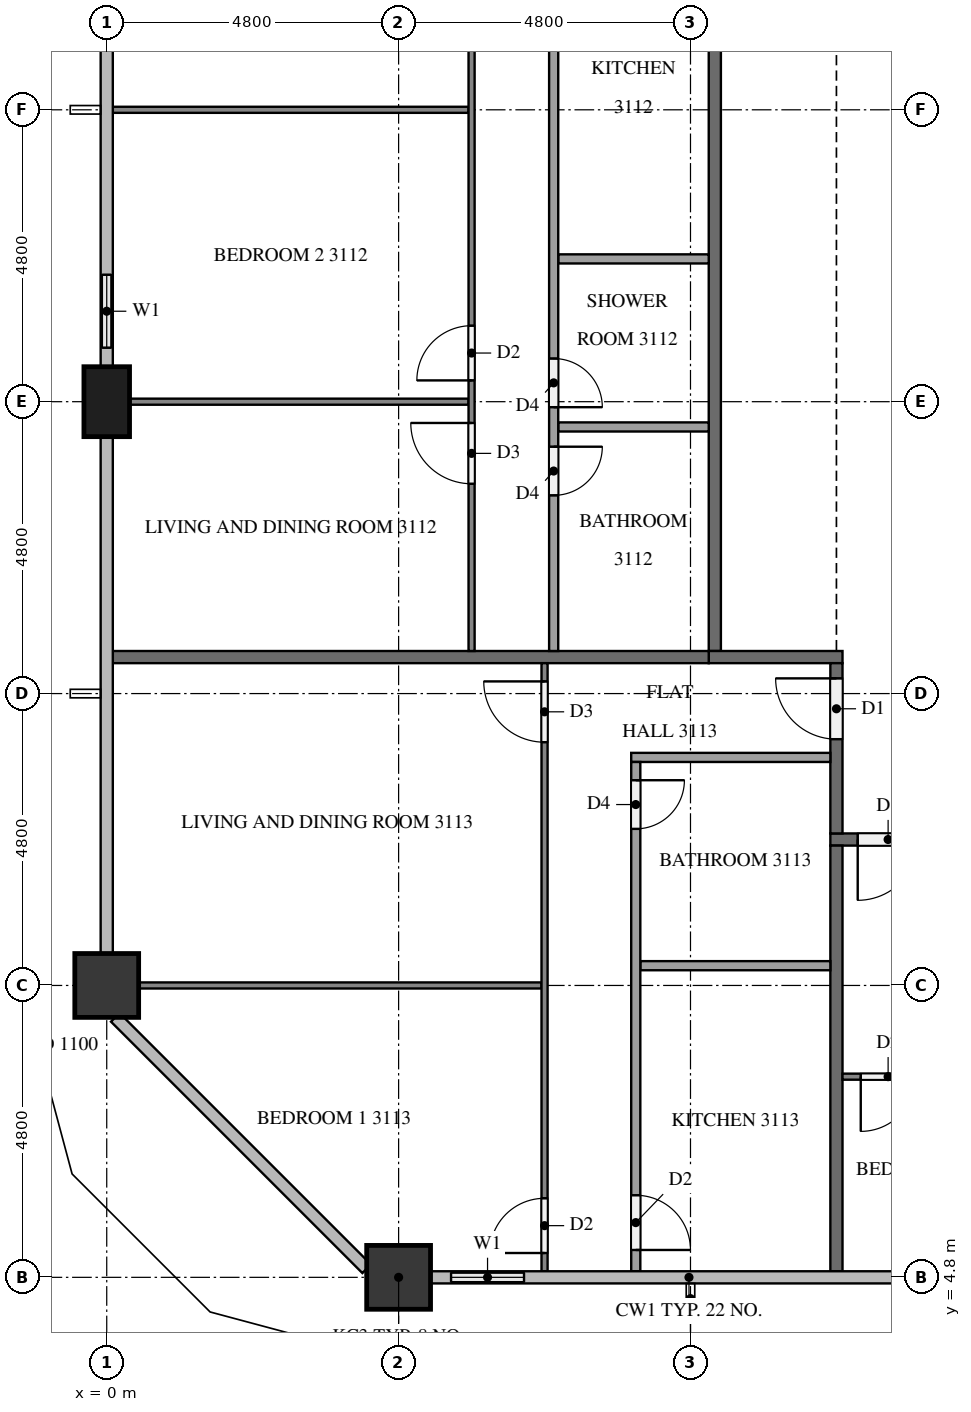
"""IFC4 building model, lengths in metres.
Left out: names, types, materials, properties, quantities, classifications, styles, units other than length and angle.
Written with IfcOpenShell. Run it as: python <this file> out.ifc"""

import sys

from ifc_helpers import new_model, si_unit, direction, frame, frame_2d, origin, origin_2d, place, context, subcontext, project, spatial, rectangle, extrude, element, fill, save


model = new_model("IFC4")
c1 = context("Model", 3, precision=1e-05, world=origin(), true_north=direction((0.0, 1.0)))
c2 = subcontext(c1, "Body", "Model", "MODEL_VIEW")
j1 = project(units=[si_unit("LENGTHUNIT", "METRE"), si_unit("PLANEANGLEUNIT", "RADIAN")], contexts=[c1])
p1 = place(None, origin())
s1 = spatial("IfcSite", under=j1, at=p1, CompositionType="ELEMENT")
p2 = place(p1, origin())
s2 = spatial("IfcBuilding", under=s1, at=p2, CompositionType="ELEMENT")
p3 = place(p2, frame((0.0, 0.0, 122.6)))
s3 = spatial("IfcBuildingStorey", under=s2, at=p3, CompositionType="ELEMENT", Elevation=122.6)
p4 = place(p3, frame((4.8, 4.8, 0.0), z_axis=(0.0, 0.0, 1.0), x_axis=(1.0, 0.0, 0.0)))
e1 = element("IfcColumn", 1, at=p4, inside=s3, PredefinedType="COLUMN", context=c2, shape_type="SweptSolid", body=[
    extrude(rectangle(XDim=1.05, YDim=1.05, at=origin_2d()), origin(), (0.0, 0.0, 1.0), 3.2),
])
p5 = place(p3, frame((0.0, 19.2, 0.0), z_axis=(0.0, 0.0, 1.0), x_axis=(0.0, 1.0, 0.0)))
e2 = element("IfcColumn", 2, at=p5, inside=s3, PredefinedType="COLUMN", context=c2, shape_type="SweptSolid", body=[
    extrude(rectangle(XDim=1.15, YDim=0.75, at=origin_2d()), origin(), (0.0, 0.0, 1.0), 3.2),
])
p6 = place(p3, frame((0.0, 9.6, 0.0), z_axis=(0.0, 0.0, 1.0), x_axis=(1.0, 0.0, 0.0)))
e3 = element("IfcColumn", 3, at=p6, inside=s3, PredefinedType="COLUMN", context=c2, shape_type="SweptSolid", body=[
    extrude(rectangle(XDim=1.05, YDim=1.05, at=origin_2d()), origin(), (0.0, 0.0, 1.0), 3.2),
])
p7 = place(p3, frame((5.325, 4.8, 0.0), z_axis=(0.0, 0.0, 1.0), x_axis=(1.0, 0.0, 0.0)))
e4 = element("IfcWall", 4, at=p7, inside=s3, PredefinedType="SOLIDWALL", context=c2, shape_type="SweptSolid", body=[
    extrude(rectangle(XDim=1.875, YDim=0.15, at=frame_2d((0.938, 0.0))), origin(), (0.0, 0.0, 1.0), 3.2),
])
p8 = place(p7, frame((0.337, 0.0, 0.9)))
e5 = element("IfcOpeningElement", 5, at=p8, cuts=e4, PredefinedType="OPENING", context=c2, shape_type="SweptSolid", body=[
    extrude(rectangle(XDim=1.2, YDim=1.4, at=frame_2d((0.6, 0.7))), frame((0.0, 0.085, 0.0), z_axis=(0.0, -1.0, 0.0), x_axis=(1.0, 0.0, 0.0)), (0.0, 0.0, 1.0), 0.17),
])
p9 = place(p3, frame((0.0, 21.6, 0.0), z_axis=(0.0, 0.0, 1.0), x_axis=(0.0, -1.0, 0.0)))
e6 = element("IfcWall", 6, at=p9, inside=s3, PredefinedType="SOLIDWALL", context=c2, shape_type="SweptSolid", body=[
    extrude(rectangle(XDim=1.825, YDim=0.15, at=frame_2d((0.913, 0.0))), origin(), (0.0, 0.0, 1.0), 3.2),
])
p10 = place(p9, frame((0.312, 0.0, 0.9)))
e7 = element("IfcOpeningElement", 7, at=p10, cuts=e6, PredefinedType="OPENING", context=c2, shape_type="SweptSolid", body=[
    extrude(rectangle(XDim=1.2, YDim=1.4, at=frame_2d((0.6, 0.7))), frame((0.0, 0.085, 0.0), z_axis=(0.0, -1.0, 0.0), x_axis=(1.0, 0.0, 0.0)), (0.0, 0.0, 1.0), 0.17),
])
p11 = place(p3, frame((50.5, 12.0, 0.0), z_axis=(0.0, 0.0, 1.0), x_axis=(-1.0, 0.0, 0.0)))
e8 = element("IfcWall", 8, at=p11, inside=s3, PredefinedType="PARTITIONING", context=c2, shape_type="SweptSolid", body=[
    extrude(rectangle(XDim=38.6, YDim=0.2, at=frame_2d((19.3, 0.0))), origin(), (0.0, 0.0, 1.0), 3.2),
])
p12 = place(p11, frame((37.15, 0.0, 0.0)))
e9 = element("IfcOpeningElement", 9, at=p12, cuts=e8, PredefinedType="OPENING", context=c2, shape_type="SweptSolid", body=[
    extrude(rectangle(XDim=1.0, YDim=2.1, at=frame_2d((0.5, 1.05))), frame((0.0, 0.11, 0.0), z_axis=(0.0, -1.0, 0.0), x_axis=(1.0, 0.0, 0.0)), (0.0, 0.0, 1.0), 0.22),
])
p13 = place(p11, frame((7.65, 0.0, 0.0)))
e10 = element("IfcOpeningElement", 10, at=p13, cuts=e8, PredefinedType="OPENING", context=c2, shape_type="SweptSolid", body=[
    extrude(rectangle(XDim=1.0, YDim=2.1, at=frame_2d((0.5, 1.05))), frame((0.0, 0.11, 0.0), z_axis=(0.0, -1.0, 0.0), x_axis=(1.0, 0.0, 0.0)), (0.0, 0.0, 1.0), 0.22),
])
p14 = place(p11, frame((5.95, 0.0, 0.0)))
e11 = element("IfcOpeningElement", 11, at=p14, cuts=e8, PredefinedType="OPENING", context=c2, shape_type="SweptSolid", body=[
    extrude(rectangle(XDim=1.0, YDim=2.1, at=frame_2d((0.5, 1.05))), frame((0.0, 0.11, 0.0), z_axis=(0.0, -1.0, 0.0), x_axis=(1.0, 0.0, 0.0)), (0.0, 0.0, 1.0), 0.22),
])
p15 = place(p3, frame((10.0, 15.1, 0.0), z_axis=(0.0, 0.0, 1.0), x_axis=(0.0, 1.0, 0.0)))
e12 = element("IfcWall", 12, at=p15, inside=s3, PredefinedType="PARTITIONING", context=c2, shape_type="SweptSolid", body=[
    extrude(rectangle(XDim=22.6, YDim=0.2, at=frame_2d((11.3, 0.0))), origin(), (0.0, 0.0, 1.0), 3.2),
])
p16 = place(p15, frame((21.35, 0.0, 0.0)))
e13 = element("IfcOpeningElement", 13, at=p16, cuts=e12, PredefinedType="OPENING", context=c2, shape_type="SweptSolid", body=[
    extrude(rectangle(XDim=1.0, YDim=2.1, at=frame_2d((0.5, 1.05))), frame((0.0, 0.11, 0.0), z_axis=(0.0, -1.0, 0.0), x_axis=(1.0, 0.0, 0.0)), (0.0, 0.0, 1.0), 0.22),
])
p17 = place(p15, frame((12.35, 0.0, 0.0)))
e14 = element("IfcOpeningElement", 14, at=p17, cuts=e12, PredefinedType="OPENING", context=c2, shape_type="SweptSolid", body=[
    extrude(rectangle(XDim=1.0, YDim=2.1, at=frame_2d((0.5, 1.05))), frame((0.0, 0.11, 0.0), z_axis=(0.0, -1.0, 0.0), x_axis=(1.0, 0.0, 0.0)), (0.0, 0.0, 1.0), 0.22),
])
p18 = place(p3, frame((9.9, 15.0, 0.0), z_axis=(0.0, 0.0, 1.0), x_axis=(1.0, 0.0, 0.0)))
e15 = element("IfcWall", 15, at=p18, inside=s3, PredefinedType="PARTITIONING", context=c2, shape_type="SweptSolid", body=[
    extrude(rectangle(XDim=2.2, YDim=0.2, at=frame_2d((1.1, 0.0))), origin(), (0.0, 0.0, 1.0), 3.2),
])
p19 = place(p3, frame((12.0, 12.1, 0.0), z_axis=(0.0, 0.0, 1.0), x_axis=(0.0, 1.0, 0.0)))
e16 = element("IfcWall", 16, at=p19, inside=s3, PredefinedType="PARTITIONING", context=c2, shape_type="SweptSolid", body=[
    extrude(rectangle(XDim=2.8, YDim=0.2, at=frame_2d((1.4, 0.0))), origin(), (0.0, 0.0, 1.0), 3.2),
])
p20 = place(p19, frame((1.55, 0.0, 0.0)))
e17 = element("IfcOpeningElement", 17, at=p20, cuts=e16, PredefinedType="OPENING", context=c2, shape_type="SweptSolid", body=[
    extrude(rectangle(XDim=1.0, YDim=2.1, at=frame_2d((0.5, 1.05))), frame((0.0, 0.11, 0.0), z_axis=(0.0, -1.0, 0.0), x_axis=(1.0, 0.0, 0.0)), (0.0, 0.0, 1.0), 0.22),
])
p21 = place(p3, frame((12.0, 4.9, 0.0), z_axis=(0.0, 0.0, 1.0), x_axis=(0.0, 1.0, 0.0)))
e18 = element("IfcWall", 18, at=p21, inside=s3, PredefinedType="PARTITIONING", context=c2, shape_type="SweptSolid", body=[
    extrude(rectangle(XDim=7.0, YDim=0.2, at=frame_2d((3.5, 0.0))), origin(), (0.0, 0.0, 1.0), 3.2),
])
p22 = place(p3, frame((0.1, 15.0, 0.0), z_axis=(0.0, 0.0, 1.0), x_axis=(1.0, 0.0, 0.0)))
e19 = element("IfcWall", 19, at=p22, inside=s3, PredefinedType="PARTITIONING", context=c2, shape_type="SweptSolid", body=[
    extrude(rectangle(XDim=9.8, YDim=0.2, at=frame_2d((4.9, 0.0))), origin(), (0.0, 0.0, 1.0), 3.2),
])
p23 = place(p3, frame((26.3, 8.1, 0.0), z_axis=(0.0, 0.0, 1.0), x_axis=(-1.0, 0.0, 0.0)))
e20 = element("IfcWall", 20, at=p23, inside=s3, PredefinedType="PARTITIONING", context=c2, shape_type="SweptSolid", body=[
    extrude(rectangle(XDim=14.2, YDim=0.1, at=frame_2d((7.1, 0.0))), origin(), (0.0, 0.0, 1.0), 3.2),
])
p24 = place(p23, frame((13.0, 0.0, 0.0)))
e21 = element("IfcOpeningElement", 21, at=p24, cuts=e20, PredefinedType="OPENING", context=c2, shape_type="SweptSolid", body=[
    extrude(rectangle(XDim=0.9, YDim=2.1, at=frame_2d((0.45, 1.05))), frame((0.0, 0.06, 0.0), z_axis=(0.0, -1.0, 0.0), x_axis=(1.0, 0.0, 0.0)), (0.0, 0.0, 1.0), 0.12),
])
p25 = place(p23, frame((5.05, 0.0, 0.0)))
e22 = element("IfcOpeningElement", 22, at=p25, cuts=e20, PredefinedType="OPENING", context=c2, shape_type="SweptSolid", body=[
    extrude(rectangle(XDim=0.9, YDim=2.1, at=frame_2d((0.45, 1.05))), frame((0.0, 0.06, 0.0), z_axis=(0.0, -1.0, 0.0), x_axis=(1.0, 0.0, 0.0)), (0.0, 0.0, 1.0), 0.12),
])
p26 = place(p23, frame((3.35, 0.0, 0.0)))
e23 = element("IfcOpeningElement", 23, at=p26, cuts=e20, PredefinedType="OPENING", context=c2, shape_type="SweptSolid", body=[
    extrude(rectangle(XDim=1.0, YDim=2.1, at=frame_2d((0.5, 1.05))), frame((0.0, 0.06, 0.0), z_axis=(0.0, -1.0, 0.0), x_axis=(1.0, 0.0, 0.0)), (0.0, 0.0, 1.0), 0.12),
])
p27 = place(p3, frame((5.95, 24.0, 0.0), z_axis=(0.0, 0.0, 1.0), x_axis=(-1.0, 0.0, 0.0)))
e24 = element("IfcWall", 24, at=p27, inside=s3, PredefinedType="PARTITIONING", context=c2, shape_type="SweptSolid", body=[
    extrude(rectangle(XDim=5.85, YDim=0.1, at=frame_2d((2.925, 0.0))), origin(), (0.0, 0.0, 1.0), 3.2),
])
p28 = place(p3, frame((5.95, 19.2, 0.0), z_axis=(0.0, 0.0, 1.0), x_axis=(-1.0, 0.0, 0.0)))
e25 = element("IfcWall", 25, at=p28, inside=s3, PredefinedType="PARTITIONING", context=c2, shape_type="SweptSolid", body=[
    extrude(rectangle(XDim=5.575, YDim=0.1, at=frame_2d((2.788, 0.0))), origin(), (0.0, 0.0, 1.0), 3.2),
])
p29 = place(p3, frame((6.0, 15.1, 0.0), z_axis=(0.0, 0.0, 1.0), x_axis=(0.0, 1.0, 0.0)))
e26 = element("IfcWall", 26, at=p29, inside=s3, PredefinedType="PARTITIONING", context=c2, shape_type="SweptSolid", body=[
    extrude(rectangle(XDim=13.6, YDim=0.1, at=frame_2d((6.8, 0.0))), origin(), (0.0, 0.0, 1.0), 3.2),
])
p30 = place(p29, frame((12.4, 0.0, 0.0)))
e27 = element("IfcOpeningElement", 27, at=p30, cuts=e26, PredefinedType="OPENING", context=c2, shape_type="SweptSolid", body=[
    extrude(rectangle(XDim=0.9, YDim=2.1, at=frame_2d((0.45, 1.05))), frame((0.0, 0.06, 0.0), z_axis=(0.0, -1.0, 0.0), x_axis=(1.0, 0.0, 0.0)), (0.0, 0.0, 1.0), 0.12),
])
p31 = place(p29, frame((4.45, 0.0, 0.0)))
e28 = element("IfcOpeningElement", 28, at=p31, cuts=e26, PredefinedType="OPENING", context=c2, shape_type="SweptSolid", body=[
    extrude(rectangle(XDim=0.9, YDim=2.1, at=frame_2d((0.45, 1.05))), frame((0.0, 0.06, 0.0), z_axis=(0.0, -1.0, 0.0), x_axis=(1.0, 0.0, 0.0)), (0.0, 0.0, 1.0), 0.12),
])
p32 = place(p29, frame((2.75, 0.0, 0.0)))
e29 = element("IfcOpeningElement", 29, at=p32, cuts=e26, PredefinedType="OPENING", context=c2, shape_type="SweptSolid", body=[
    extrude(rectangle(XDim=1.0, YDim=2.1, at=frame_2d((0.5, 1.05))), frame((0.0, 0.06, 0.0), z_axis=(0.0, -1.0, 0.0), x_axis=(1.0, 0.0, 0.0)), (0.0, 0.0, 1.0), 0.12),
])
for number, where, z_axis, x_axis in (
    (30, (9.9, 21.548, 0.0), (0.0, 0.0, 1.0), (-1.0, 0.0, 0.0)),
    (31, (9.9, 18.785, 0.0), (0.0, 0.0, 1.0), (-1.0, 0.0, 0.0)),
):
    element("IfcWall", number, at=place(p3, frame(where, z_axis=z_axis, x_axis=x_axis)), inside=s3, PredefinedType="PARTITIONING", context=c2, shape_type="SweptSolid", body=[
        extrude(rectangle(XDim=2.475, YDim=0.15, at=frame_2d((1.237, 0.0))), origin(), (0.0, 0.0, 1.0), 3.2),
    ])
p33 = place(p3, frame((7.35, 27.075, 0.0), z_axis=(0.0, 0.0, 1.0), x_axis=(0.0, -1.0, 0.0)))
e32 = element("IfcWall", 32, at=p33, inside=s3, PredefinedType="PARTITIONING", context=c2, shape_type="SweptSolid", body=[
    extrude(rectangle(XDim=11.975, YDim=0.15, at=frame_2d((5.987, 0.0))), origin(), (0.0, 0.0, 1.0), 3.2),
])
p34 = place(p33, frame((0.3, 0.0, 0.0)))
e33 = element("IfcOpeningElement", 33, at=p34, cuts=e32, PredefinedType="OPENING", context=c2, shape_type="SweptSolid", body=[
    extrude(rectangle(XDim=0.9, YDim=2.1, at=frame_2d((0.45, 1.05))), frame((0.0, 0.085, 0.0), z_axis=(0.0, -1.0, 0.0), x_axis=(1.0, 0.0, 0.0)), (0.0, 0.0, 1.0), 0.17),
])
p35 = place(p33, frame((7.165, 0.0, 0.0)))
e34 = element("IfcOpeningElement", 34, at=p35, cuts=e32, PredefinedType="OPENING", context=c2, shape_type="SweptSolid", body=[
    extrude(rectangle(XDim=0.8, YDim=2.1, at=frame_2d((0.4, 1.05))), frame((0.0, 0.085, 0.0), z_axis=(0.0, -1.0, 0.0), x_axis=(1.0, 0.0, 0.0)), (0.0, 0.0, 1.0), 0.17),
])
p36 = place(p33, frame((8.615, 0.0, 0.0)))
e35 = element("IfcOpeningElement", 35, at=p36, cuts=e32, PredefinedType="OPENING", context=c2, shape_type="SweptSolid", body=[
    extrude(rectangle(XDim=0.8, YDim=2.1, at=frame_2d((0.4, 1.05))), frame((0.0, 0.085, 0.0), z_axis=(0.0, -1.0, 0.0), x_axis=(1.0, 0.0, 0.0)), (0.0, 0.0, 1.0), 0.17),
])
p37 = place(p3, frame((7.15, 9.6, 0.0), z_axis=(0.0, 0.0, 1.0), x_axis=(-1.0, 0.0, 0.0)))
e36 = element("IfcWall", 36, at=p37, inside=s3, PredefinedType="PARTITIONING", context=c2, shape_type="SweptSolid", body=[
    extrude(rectangle(XDim=6.625, YDim=0.1, at=frame_2d((3.312, 0.0))), origin(), (0.0, 0.0, 1.0), 3.2),
])
p38 = place(p3, frame((7.2, 4.9, 0.0), z_axis=(0.0, 0.0, 1.0), x_axis=(0.0, 1.0, 0.0)))
e37 = element("IfcWall", 37, at=p38, inside=s3, PredefinedType="PARTITIONING", context=c2, shape_type="SweptSolid", body=[
    extrude(rectangle(XDim=10.0, YDim=0.1, at=frame_2d((5.0, 0.0))), origin(), (0.0, 0.0, 1.0), 3.2),
])
p39 = place(p38, frame((8.7, 0.0, 0.0)))
e38 = element("IfcOpeningElement", 38, at=p39, cuts=e37, PredefinedType="OPENING", context=c2, shape_type="SweptSolid", body=[
    extrude(rectangle(XDim=1.0, YDim=2.1, at=frame_2d((0.5, 1.05))), frame((0.0, 0.06, 0.0), z_axis=(0.0, -1.0, 0.0), x_axis=(1.0, 0.0, 0.0)), (0.0, 0.0, 1.0), 0.12),
])
p40 = place(p38, frame((0.3, 0.0, 0.0)))
e39 = element("IfcOpeningElement", 39, at=p40, cuts=e37, PredefinedType="OPENING", context=c2, shape_type="SweptSolid", body=[
    extrude(rectangle(XDim=0.9, YDim=2.1, at=frame_2d((0.45, 1.05))), frame((0.0, 0.06, 0.0), z_axis=(0.0, -1.0, 0.0), x_axis=(1.0, 0.0, 0.0)), (0.0, 0.0, 1.0), 0.12),
])
p41 = place(p3, frame((11.9, 9.925, 0.0), z_axis=(0.0, 0.0, 1.0), x_axis=(-1.0, 0.0, 0.0)))
e40 = element("IfcWall", 40, at=p41, inside=s3, PredefinedType="PARTITIONING", context=c2, shape_type="SweptSolid", body=[
    extrude(rectangle(XDim=3.125, YDim=0.15, at=frame_2d((1.562, 0.0))), origin(), (0.0, 0.0, 1.0), 3.2),
])
p42 = place(p3, frame((11.9, 13.35, 0.0), z_axis=(0.0, 0.0, 1.0), x_axis=(-1.0, 0.0, 0.0)))
e41 = element("IfcWall", 41, at=p42, inside=s3, PredefinedType="PARTITIONING", context=c2, shape_type="SweptSolid", body=[
    extrude(rectangle(XDim=3.275, YDim=0.15, at=frame_2d((1.637, 0.0))), origin(), (0.0, 0.0, 1.0), 3.2),
])
p43 = place(p3, frame((8.7, 13.275, 0.0), z_axis=(0.0, 0.0, 1.0), x_axis=(0.0, -1.0, 0.0)))
e42 = element("IfcWall", 42, at=p43, inside=s3, PredefinedType="PARTITIONING", context=c2, shape_type="SweptSolid", body=[
    extrude(rectangle(XDim=8.375, YDim=0.15, at=frame_2d((4.188, 0.0))), origin(), (0.0, 0.0, 1.0), 3.2),
])
p44 = place(p43, frame((0.3, 0.0, 0.0)))
e43 = element("IfcOpeningElement", 43, at=p44, cuts=e42, PredefinedType="OPENING", context=c2, shape_type="SweptSolid", body=[
    extrude(rectangle(XDim=0.8, YDim=2.1, at=frame_2d((0.4, 1.05))), frame((0.0, 0.085, 0.0), z_axis=(0.0, -1.0, 0.0), x_axis=(1.0, 0.0, 0.0)), (0.0, 0.0, 1.0), 0.17),
])
p45 = place(p43, frame((7.125, 0.0, 0.0)))
e44 = element("IfcOpeningElement", 44, at=p45, cuts=e42, PredefinedType="OPENING", context=c2, shape_type="SweptSolid", body=[
    extrude(rectangle(XDim=0.9, YDim=2.1, at=frame_2d((0.45, 1.05))), frame((0.0, 0.085, 0.0), z_axis=(0.0, -1.0, 0.0), x_axis=(1.0, 0.0, 0.0)), (0.0, 0.0, 1.0), 0.17),
])
p46 = place(p8, origin())
e45 = element("IfcWindow", 45, at=p46, inside=s3, PartitioningType="SINGLE_PANEL", PredefinedType="WINDOW", context=c2, shape_type="SweptSolid", body=[
    extrude(rectangle(XDim=1.2, YDim=1.4, at=frame_2d((0.6, 0.7))), frame((0.0, 0.03, 0.0), z_axis=(0.0, -1.0, 0.0), x_axis=(1.0, 0.0, 0.0)), (0.0, 0.0, 1.0), 0.06),
])
fill(e5, e45)
p47 = place(p10, origin())
e46 = element("IfcWindow", 46, at=p47, inside=s3, PartitioningType="SINGLE_PANEL", PredefinedType="WINDOW", context=c2, shape_type="SweptSolid", body=[
    extrude(rectangle(XDim=1.2, YDim=1.4, at=frame_2d((0.6, 0.7))), frame((0.0, 0.03, 0.0), z_axis=(0.0, -1.0, 0.0), x_axis=(1.0, 0.0, 0.0)), (0.0, 0.0, 1.0), 0.06),
])
fill(e7, e46)
p48 = place(p12, origin())
e47 = element("IfcDoor", 47, at=p48, inside=s3, OperationType="SINGLE_SWING_RIGHT", PredefinedType="DOOR", context=c2, shape_type="SweptSolid", body=[
    extrude(rectangle(XDim=1.0, YDim=2.1, at=frame_2d((0.5, 1.05))), frame((0.0, 0.025, 0.0), z_axis=(0.0, -1.0, 0.0), x_axis=(1.0, 0.0, 0.0)), (0.0, 0.0, 1.0), 0.05),
])
fill(e9, e47)
p49 = place(p20, origin())
e48 = element("IfcDoor", 48, at=p49, inside=s3, OperationType="SINGLE_SWING_RIGHT", PredefinedType="DOOR", context=c2, shape_type="SweptSolid", body=[
    extrude(rectangle(XDim=1.0, YDim=2.1, at=frame_2d((0.5, 1.05))), frame((0.0, 0.025, 0.0), z_axis=(0.0, -1.0, 0.0), x_axis=(1.0, 0.0, 0.0)), (0.0, 0.0, 1.0), 0.05),
])
fill(e17, e48)
p50 = place(p24, origin())
e49 = element("IfcDoor", 49, at=p50, inside=s3, OperationType="SINGLE_SWING_RIGHT", PredefinedType="DOOR", context=c2, shape_type="SweptSolid", body=[
    extrude(rectangle(XDim=0.9, YDim=2.1, at=frame_2d((0.45, 1.05))), frame((0.0, 0.025, 0.0), z_axis=(0.0, -1.0, 0.0), x_axis=(1.0, 0.0, 0.0)), (0.0, 0.0, 1.0), 0.05),
])
fill(e21, e49)
p51 = place(p31, origin())
e50 = element("IfcDoor", 50, at=p51, inside=s3, OperationType="SINGLE_SWING_LEFT", PredefinedType="DOOR", context=c2, shape_type="SweptSolid", body=[
    extrude(rectangle(XDim=0.9, YDim=2.1, at=frame_2d((0.45, 1.05))), frame((0.0, 0.025, 0.0), z_axis=(0.0, -1.0, 0.0), x_axis=(1.0, 0.0, 0.0)), (0.0, 0.0, 1.0), 0.05),
])
fill(e28, e50)
p52 = place(p32, origin())
e51 = element("IfcDoor", 51, at=p52, inside=s3, OperationType="SINGLE_SWING_RIGHT", PredefinedType="DOOR", context=c2, shape_type="SweptSolid", body=[
    extrude(rectangle(XDim=1.0, YDim=2.1, at=frame_2d((0.5, 1.05))), frame((0.0, 0.025, 0.0), z_axis=(0.0, -1.0, 0.0), x_axis=(1.0, 0.0, 0.0)), (0.0, 0.0, 1.0), 0.05),
])
fill(e29, e51)
p53 = place(p35, origin())
e52 = element("IfcDoor", 52, at=p53, inside=s3, OperationType="SINGLE_SWING_RIGHT", PredefinedType="DOOR", context=c2, shape_type="SweptSolid", body=[
    extrude(rectangle(XDim=0.8, YDim=2.1, at=frame_2d((0.4, 1.05))), frame((0.0, 0.025, 0.0), z_axis=(0.0, -1.0, 0.0), x_axis=(1.0, 0.0, 0.0)), (0.0, 0.0, 1.0), 0.05),
])
fill(e34, e52)
p54 = place(p36, origin())
e53 = element("IfcDoor", 53, at=p54, inside=s3, OperationType="SINGLE_SWING_LEFT", PredefinedType="DOOR", context=c2, shape_type="SweptSolid", body=[
    extrude(rectangle(XDim=0.8, YDim=2.1, at=frame_2d((0.4, 1.05))), frame((0.0, 0.025, 0.0), z_axis=(0.0, -1.0, 0.0), x_axis=(1.0, 0.0, 0.0)), (0.0, 0.0, 1.0), 0.05),
])
fill(e35, e53)
p55 = place(p39, origin())
e54 = element("IfcDoor", 54, at=p55, inside=s3, OperationType="SINGLE_SWING_RIGHT", PredefinedType="DOOR", context=c2, shape_type="SweptSolid", body=[
    extrude(rectangle(XDim=1.0, YDim=2.1, at=frame_2d((0.5, 1.05))), frame((0.0, 0.025, 0.0), z_axis=(0.0, -1.0, 0.0), x_axis=(1.0, 0.0, 0.0)), (0.0, 0.0, 1.0), 0.05),
])
fill(e38, e54)
p56 = place(p40, origin())
e55 = element("IfcDoor", 55, at=p56, inside=s3, OperationType="SINGLE_SWING_LEFT", PredefinedType="DOOR", context=c2, shape_type="SweptSolid", body=[
    extrude(rectangle(XDim=0.9, YDim=2.1, at=frame_2d((0.45, 1.05))), frame((0.0, 0.025, 0.0), z_axis=(0.0, -1.0, 0.0), x_axis=(1.0, 0.0, 0.0)), (0.0, 0.0, 1.0), 0.05),
])
fill(e39, e55)
p57 = place(p44, origin())
e56 = element("IfcDoor", 56, at=p57, inside=s3, OperationType="SINGLE_SWING_LEFT", PredefinedType="DOOR", context=c2, shape_type="SweptSolid", body=[
    extrude(rectangle(XDim=0.8, YDim=2.1, at=frame_2d((0.4, 1.05))), frame((0.0, 0.025, 0.0), z_axis=(0.0, -1.0, 0.0), x_axis=(1.0, 0.0, 0.0)), (0.0, 0.0, 1.0), 0.05),
])
fill(e43, e56)
p58 = place(p45, origin())
e57 = element("IfcDoor", 57, at=p58, inside=s3, OperationType="SINGLE_SWING_RIGHT", PredefinedType="DOOR", context=c2, shape_type="SweptSolid", body=[
    extrude(rectangle(XDim=0.9, YDim=2.1, at=frame_2d((0.45, 1.05))), frame((0.0, 0.025, 0.0), z_axis=(0.0, -1.0, 0.0), x_axis=(1.0, 0.0, 0.0)), (0.0, 0.0, 1.0), 0.05),
])
fill(e44, e57)
save(model, sys.argv[1])
